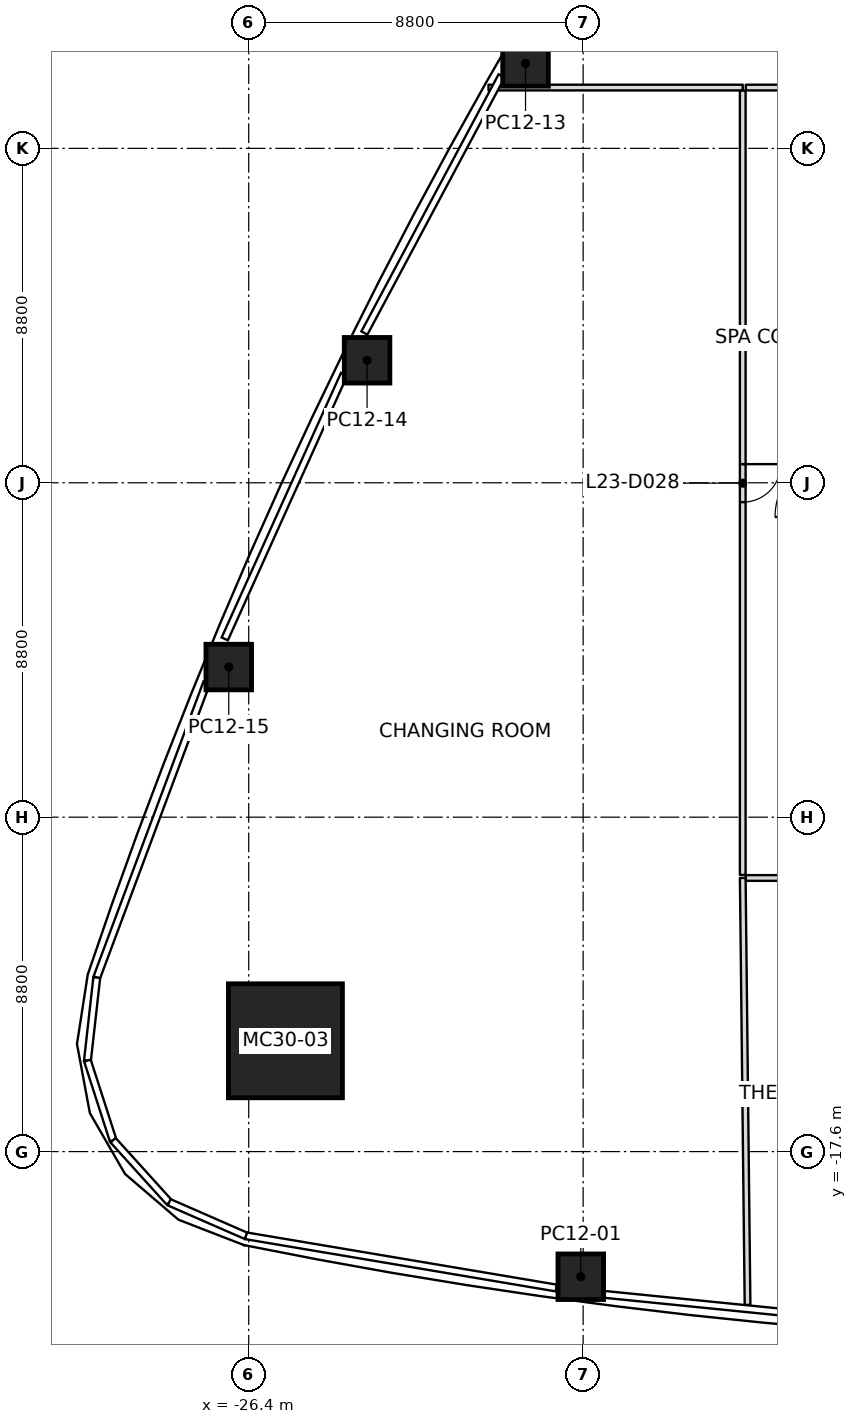
"""IFC4 building model, lengths in metres.
Left out: names, types, materials, properties, quantities, classifications, styles, units other than length and angle.
Written with IfcOpenShell. Run it as: python <this file> out.ifc"""

import sys

from ifc_helpers import new_model, si_unit, direction, frame, frame_2d, origin, origin_2d, place, context, subcontext, project, spatial, rectangle, extrude, clip, halfspace, element, fill, save


model = new_model("IFC4")
c1 = context("Model", 3, precision=1e-05, world=origin(), true_north=direction((0.0, 1.0)))
c2 = subcontext(c1, "Body", "Model", "MODEL_VIEW")
j1 = project(units=[si_unit("LENGTHUNIT", "METRE"), si_unit("PLANEANGLEUNIT", "RADIAN")], contexts=[c1])
p1 = place(None, origin())
s1 = spatial("IfcSite", under=j1, at=p1, CompositionType="ELEMENT")
p2 = place(p1, origin())
s2 = spatial("IfcBuilding", under=s1, at=p2, CompositionType="ELEMENT")
p3 = place(p2, frame((0.0, 0.0, 107.2)))
s3 = spatial("IfcBuildingStorey", under=s2, at=p3, CompositionType="ELEMENT", Elevation=107.2)
p4 = place(p3, frame((-25.434, -14.684, 0.0), z_axis=(0.020880956331, 0.012022368797, 0.999709682013), x_axis=(0.999781969063, -0.000251093304, -0.020879446579)))
e1 = element("IfcColumn", 1, at=p4, inside=s3, PredefinedType="COLUMN", context=c2, shape_type="SweptSolid", body=[
    clip(clip(extrude(rectangle(XDim=3.0, YDim=3.0, at=origin_2d()), origin(), (0.0, 0.0, 1.0), 5.402), halfspace(frame((0.0, 0.0, 0.012)), True)), halfspace(frame((0.0, 0.0, 5.399)), False)),
])
p5 = place(p3, frame((-17.662, -20.893, 0.0), z_axis=(0.013154574087, 0.007775212175, 0.999883244812), x_axis=(-0.991031175757, 0.133090691637, 0.012003186093)))
e2 = element("IfcColumn", 2, at=p5, inside=s3, PredefinedType="COLUMN", context=c2, shape_type="SweptSolid", body=[
    clip(clip(extrude(rectangle(XDim=1.2, YDim=1.2, at=origin_2d()), origin(), (0.0, 0.0, 1.0), 5.401), halfspace(frame((0.0, 0.0, 0.003)), True)), halfspace(frame((0.0, 0.0, 5.397)), False)),
])
p6 = place(p3, frame((-19.116, 11.036, 0.0), z_axis=(0.007323758915, -0.004204380118, 0.999964342236), x_axis=(0.499986590459, 0.866033145402, -2.0649448e-05)))
e3 = element("IfcColumn", 3, at=p6, inside=s3, PredefinedType="COLUMN", context=c2, shape_type="SweptSolid", body=[
    clip(clip(extrude(rectangle(XDim=1.2, YDim=1.2, at=origin_2d()), origin(), (0.0, 0.0, 1.0), 5.4), halfspace(frame((0.0, 0.0, 0.001)), True)), halfspace(frame((0.0, 0.0, 5.397)), False)),
])
p7 = place(p3, frame((-23.285, 3.224, 0.0), z_axis=(0.010488130075, 0.001582261003, 0.999943746207), x_axis=(0.441147996554, 0.897413994602, -0.006047100909)))
e4 = element("IfcColumn", 4, at=p7, inside=s3, PredefinedType="COLUMN", context=c2, shape_type="SweptSolid", body=[
    clip(clip(extrude(rectangle(XDim=1.2, YDim=1.2, at=origin_2d()), origin(), (0.0, 0.0, 1.0), 5.4), halfspace(frame((0.0, 0.0, 0.002)), True)), halfspace(frame((0.0, 0.0, 5.397)), False)),
])
p8 = place(p3, frame((-26.925, -4.849, 0.0), z_axis=(0.01329019196, 0.007503985937, 0.999883523713), x_axis=(0.380349266777, 0.924765125623, -0.011995736484)))
e5 = element("IfcColumn", 5, at=p8, inside=s3, PredefinedType="COLUMN", context=c2, shape_type="SweptSolid", body=[
    clip(clip(extrude(rectangle(XDim=1.2, YDim=1.2, at=origin_2d()), origin(), (0.0, 0.0, 1.0), 5.401), halfspace(frame((0.0, 0.0, 0.003)), True)), halfspace(frame((0.0, 0.0, 5.397)), False)),
])
p9 = place(p3, frame((-13.4, 10.4, 0.0), z_axis=(0.0, 0.0, 1.0), x_axis=(-1.0, 0.0, 0.0)))
e6 = element("IfcWall", 6, at=p9, inside=s3, PredefinedType="PARTITIONING", context=c2, shape_type="SweptSolid", body=[
    extrude(rectangle(XDim=6.69, YDim=0.15, at=frame_2d((3.345, 0.0))), origin(), (0.0, 0.0, 1.0), 4.534),
])
p10 = place(p3, frame((-13.4, -10.4, 0.0), z_axis=(0.0, 0.0, 1.0), x_axis=(0.011211567949, -0.999937148397, 0.0)))
e7 = element("IfcWall", 7, at=p10, inside=s3, PredefinedType="PARTITIONING", context=c2, shape_type="SweptSolid", body=[
    extrude(rectangle(XDim=11.236, YDim=0.15, at=frame_2d((5.618, 0.0))), origin(), (0.0, 0.0, 1.0), 4.534),
])
p11 = place(p3, frame((-13.4, 10.32, 0.0), z_axis=(0.0, 0.0, 1.0), x_axis=(0.0, -1.0, 0.0)))
e8 = element("IfcWall", 8, at=p11, inside=s3, PredefinedType="PARTITIONING", context=c2, shape_type="SweptSolid", body=[
    extrude(rectangle(XDim=20.64, YDim=0.15, at=frame_2d((10.32, 0.0))), origin(), (0.0, 0.0, 1.0), 4.397),
])
p12 = place(p11, frame((9.83, 0.0, 0.0)))
e9 = element("IfcOpeningElement", 9, at=p12, cuts=e8, PredefinedType="OPENING", context=c2, shape_type="SweptSolid", body=[
    extrude(rectangle(XDim=1.0, YDim=2.1, at=frame_2d((0.5, 1.05))), frame((0.0, 0.075, 0.0), z_axis=(0.0, -1.0, 0.0), x_axis=(1.0, 0.0, 0.0)), (0.0, 0.0, 1.0), 0.15),
])
p13 = place(p3, frame((-13.32, -10.4, 0.0), z_axis=(0.0, 0.0, 1.0), x_axis=(1.0, 0.0, 0.0)))
e10 = element("IfcWall", 10, at=p13, inside=s3, PredefinedType="PARTITIONING", context=c2, shape_type="SweptSolid", body=[
    extrude(rectangle(XDim=26.64, YDim=0.15, at=frame_2d((13.32, 0.0))), origin(), (0.0, 0.0, 1.0), 4.538),
])
p14 = place(p13, frame((1.82, 0.0, 0.0)))
e11 = element("IfcOpeningElement", 11, at=p14, cuts=e10, PredefinedType="OPENING", context=c2, shape_type="SweptSolid", body=[
    extrude(rectangle(XDim=1.0, YDim=2.1, at=frame_2d((0.5, 1.05))), frame((0.0, 0.075, 0.0), z_axis=(0.0, -1.0, 0.0), x_axis=(1.0, 0.0, 0.0)), (0.0, 0.0, 1.0), 0.15),
])
p15 = place(p13, frame((15.22, 0.0, 0.0)))
e12 = element("IfcOpeningElement", 12, at=p15, cuts=e10, PredefinedType="OPENING", context=c2, shape_type="SweptSolid", body=[
    extrude(rectangle(XDim=1.0, YDim=2.1, at=frame_2d((0.5, 1.05))), frame((0.0, 0.075, 0.0), z_axis=(0.0, -1.0, 0.0), x_axis=(1.0, 0.0, 0.0)), (0.0, 0.0, 1.0), 0.15),
])
p16 = place(p3, frame((13.32, 10.4, 0.0), z_axis=(0.0, 0.0, 1.0), x_axis=(-1.0, 0.0, 0.0)))
e13 = element("IfcWall", 13, at=p16, inside=s3, PredefinedType="PARTITIONING", context=c2, shape_type="SweptSolid", body=[
    extrude(rectangle(XDim=26.64, YDim=0.15, at=frame_2d((13.32, 0.0))), origin(), (0.0, 0.0, 1.0), 4.397),
])
p17 = place(p16, frame((6.11, 0.0, 0.0)))
e14 = element("IfcOpeningElement", 14, at=p17, cuts=e13, PredefinedType="OPENING", context=c2, shape_type="SweptSolid", body=[
    extrude(rectangle(XDim=2.4, YDim=2.1, at=frame_2d((1.2, 1.05))), frame((0.0, 0.075, 0.0), z_axis=(0.0, -1.0, 0.0), x_axis=(1.0, 0.0, 0.0)), (0.0, 0.0, 1.0), 0.15),
])
p18 = place(p16, frame((16.32, 0.0, 0.0)))
e15 = element("IfcOpeningElement", 15, at=p18, cuts=e13, PredefinedType="OPENING", context=c2, shape_type="SweptSolid", body=[
    extrude(rectangle(XDim=1.0, YDim=2.1, at=frame_2d((0.5, 1.05))), frame((0.0, 0.075, 0.0), z_axis=(0.0, -1.0, 0.0), x_axis=(1.0, 0.0, 0.0)), (0.0, 0.0, 1.0), 0.15),
])
p19 = place(p16, frame((21.98, 0.0, 0.0)))
e16 = element("IfcOpeningElement", 16, at=p19, cuts=e13, PredefinedType="OPENING", context=c2, shape_type="SweptSolid", body=[
    extrude(rectangle(XDim=1.8, YDim=2.1, at=frame_2d((0.9, 1.05))), frame((0.0, 0.075, 0.0), z_axis=(0.0, -1.0, 0.0), x_axis=(1.0, 0.0, 0.0)), (0.0, 0.0, 1.0), 0.15),
])
p20 = place(p12, origin())
e17 = element("IfcDoor", 17, at=p20, inside=s3, OperationType="SINGLE_SWING_RIGHT", PredefinedType="DOOR", context=c2, shape_type="SweptSolid", body=[
    extrude(rectangle(XDim=1.0, YDim=2.1, at=frame_2d((0.5, 1.05))), frame((0.0, 0.025, 0.0), z_axis=(0.0, -1.0, 0.0), x_axis=(1.0, 0.0, 0.0)), (0.0, 0.0, 1.0), 0.05),
])
fill(e9, e17)
save(model, sys.argv[1])
